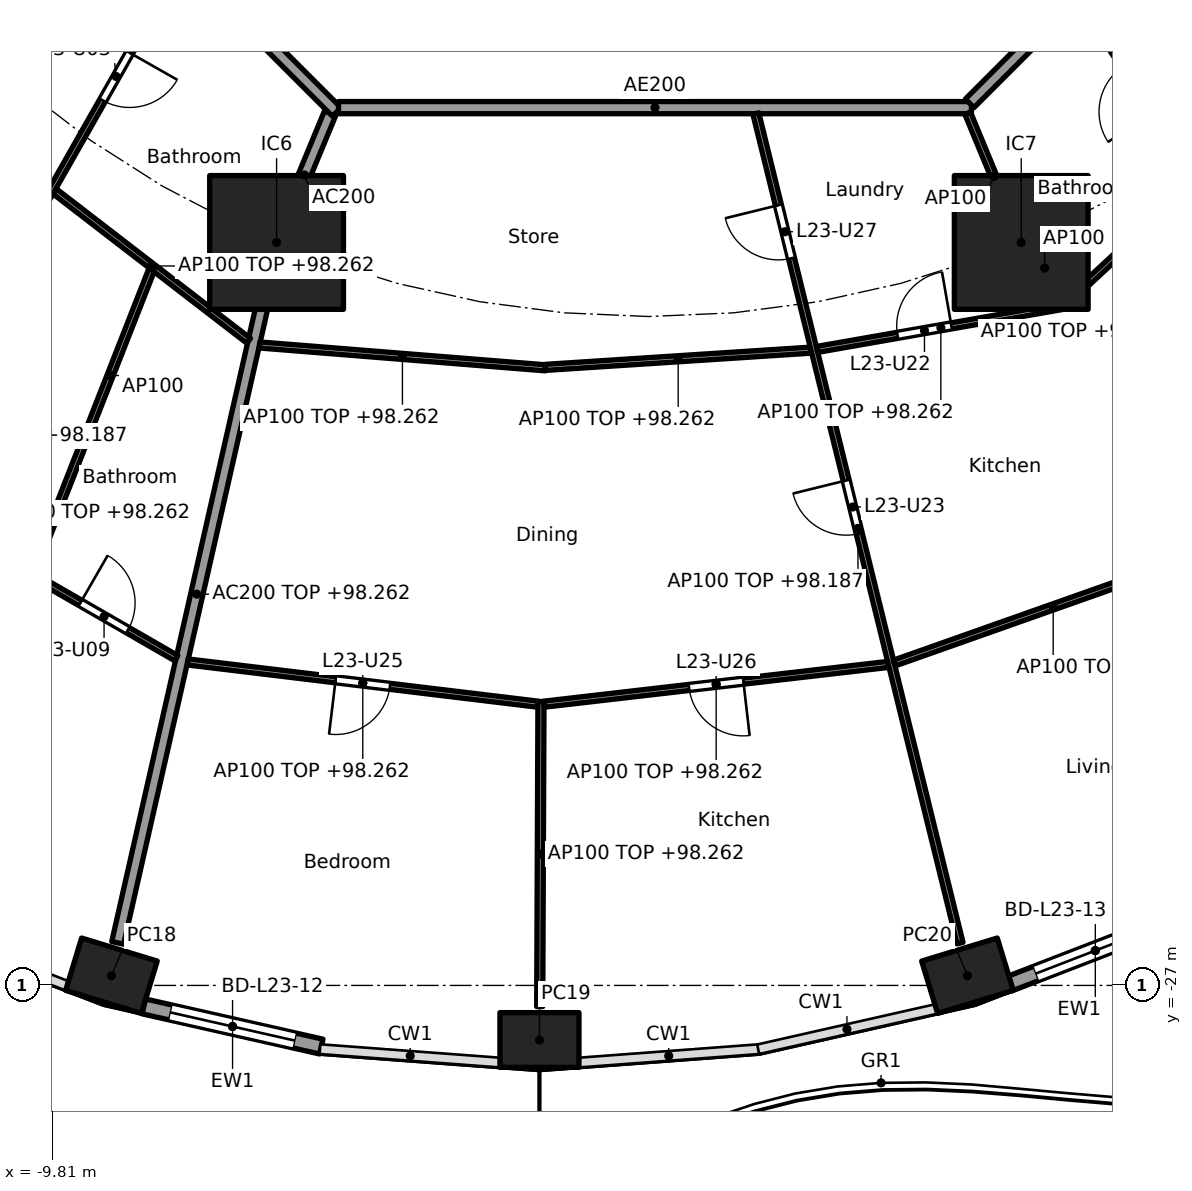
"""IFC4 building model, lengths in metres.
Left out: names, types, materials, properties, quantities, classifications, styles, units other than length and angle.
Written with IfcOpenShell. Run it as: python <this file> out.ifc"""

import sys

from ifc_helpers import new_model, si_unit, direction, frame, frame_2d, origin, origin_2d, place, context, subcontext, project, spatial, rectangle, hollow_rectangle, extrude, element, fill, save


model = new_model("IFC4")
c1 = context("Model", 3, precision=1e-05, world=origin(), true_north=direction((0.0, 1.0)))
c2 = subcontext(c1, "Body", "Model", "MODEL_VIEW")
j1 = project(units=[si_unit("LENGTHUNIT", "METRE"), si_unit("PLANEANGLEUNIT", "RADIAN")], contexts=[c1])
p1 = place(None, origin())
s1 = spatial("IfcSite", under=j1, at=p1, CompositionType="ELEMENT")
p2 = place(p1, origin())
s2 = spatial("IfcBuilding", under=s1, at=p2, CompositionType="ELEMENT")
p3 = place(p2, frame((0.0, 0.0, 95.5)))
s3 = spatial("IfcBuildingStorey", under=s2, at=p3, CompositionType="ELEMENT", Elevation=95.5)
for number, where, z_axis, x_axis in (
    (1, (-8.839, -26.841, 0.0), (0.0, 0.0, 1.0), (0.957, -0.292, 0.0)),
    (2, (-1.8, -27.897, 0.0), (0.0, 0.0, 1.0), (1.0, 0.0, 0.0)),
    (3, (5.239, -26.841, 0.0), (0.0, 0.0, 1.0), (0.957, 0.292, 0.0)),
):
    element("IfcColumn", number, at=place(p3, frame(where, z_axis=z_axis, x_axis=x_axis)), inside=s3, PredefinedType="COLUMN", context=c2, shape_type="SweptSolid", body=[
        extrude(hollow_rectangle(XDim=1.3, YDim=0.9, WallThickness=0.045, at=origin_2d()), origin(), (0.0, 0.0, 1.0), 3.7),
    ])
for number, where, z_axis, x_axis in (
    (4, (-6.123, -14.782, 0.0), (0.0, 0.0, 1.0), (1.0, 0.0, 0.0)),
    (5, (6.123, -14.782, 0.0), (0.0, 0.0, 1.0), (1.0, 0.0, 0.0)),
):
    element("IfcColumn", number, at=place(p3, frame(where, z_axis=z_axis, x_axis=x_axis)), inside=s3, PredefinedType="COLUMN", context=c2, shape_type="SweptSolid", body=[
        extrude(rectangle(XDim=2.2, YDim=2.2, at=origin_2d()), origin(), (0.0, 0.0, 1.0), 3.7),
    ])
p4 = place(p3, frame((-5.387, -28.006, 0.0), z_axis=(0.0, 0.0, 1.0), x_axis=(-0.975317607872, 0.220806620767, 0.0)))
e6 = element("IfcWall", 6, at=p4, inside=s3, PredefinedType="SOLIDWALL", context=c2, shape_type="SweptSolid", body=[
    extrude(rectangle(XDim=2.993, YDim=0.25, at=frame_2d((1.497, 0.0))), origin(), (0.0, 0.0, 1.0), 3.44),
])
p5 = place(p4, frame((0.447, 0.0, 0.0)))
e7 = element("IfcOpeningElement", 7, at=p5, cuts=e6, PredefinedType="OPENING", context=c2, shape_type="SweptSolid", body=[
    extrude(rectangle(XDim=2.1, YDim=2.4, at=frame_2d((1.05, 1.2))), frame((0.0, 0.135, 0.0), z_axis=(0.0, -1.0, 0.0), x_axis=(1.0, 0.0, 0.0)), (0.0, 0.0, 1.0), 0.27),
])
p6 = place(p3, frame((8.753, -25.882, 0.0), z_axis=(0.0, 0.0, 1.0), x_axis=(-0.932837560624, -0.360297218263, 0.0)))
e8 = element("IfcWall", 8, at=p6, inside=s3, PredefinedType="SOLIDWALL", context=c2, shape_type="SweptSolid", body=[
    extrude(rectangle(XDim=3.028, YDim=0.25, at=frame_2d((1.514, 0.0))), origin(), (0.0, 0.0, 1.0), 3.44),
])
p7 = place(p6, frame((0.464, 0.0, 0.0)))
e9 = element("IfcOpeningElement", 9, at=p7, cuts=e8, PredefinedType="OPENING", context=c2, shape_type="SweptSolid", body=[
    extrude(rectangle(XDim=2.1, YDim=2.4, at=frame_2d((1.05, 1.2))), frame((0.0, 0.135, 0.0), z_axis=(0.0, -1.0, 0.0), x_axis=(1.0, 0.0, 0.0)), (0.0, 0.0, 1.0), 0.27),
])
p8 = place(p3, frame((-5.243, -12.657, 0.0), z_axis=(0.0, 0.0, 1.0), x_axis=(-0.382668627144, -0.923885664896, 0.0)))
e10 = element("IfcWall", 10, at=p8, inside=s3, PredefinedType="PARTITIONING", context=c2, shape_type="SweptSolid", body=[
    extrude(rectangle(XDim=2.2, YDim=0.2, at=frame_2d((1.1, 0.0))), origin(), (0.0, 0.0, 1.0), 3.44),
])
p9 = place(p3, frame((-6.134, -14.831, 0.0), z_axis=(0.0, 0.0, 1.0), x_axis=(-0.221225405869, -0.975222702667, 0.0)))
e11 = element("IfcWall", 11, at=p9, inside=s3, PredefinedType="PARTITIONING", context=c2, shape_type="SweptSolid", body=[
    extrude(rectangle(XDim=11.761, YDim=0.2, at=frame_2d((5.88, 0.0))), origin(), (0.0, 0.0, 1.0), 2.762),
])
p10 = place(p3, frame((-12.635, -5.134, 0.0), z_axis=(0.0, 0.0, 1.0), x_axis=(0.707106781187, -0.707106781187, 0.0)))
e12 = element("IfcWall", 12, at=p10, inside=s3, PredefinedType="PARTITIONING", context=c2, shape_type="SweptSolid", body=[
    extrude(rectangle(XDim=10.609, YDim=0.2, at=frame_2d((5.305, 0.0))), origin(), (0.0, 0.0, 1.0), 3.44),
])
p11 = place(p10, frame((4.804, 0.0, 0.0)))
e13 = element("IfcOpeningElement", 13, at=p11, cuts=e12, PredefinedType="OPENING", context=c2, shape_type="SweptSolid", body=[
    extrude(rectangle(XDim=1.0, YDim=2.1, at=frame_2d((0.5, 1.05))), frame((0.0, 0.11, 0.0), z_axis=(0.0, -1.0, 0.0), x_axis=(1.0, 0.0, 0.0)), (0.0, 0.0, 1.0), 0.22),
])
p12 = place(p3, frame((-5.104, -12.565, 0.0), z_axis=(0.0, 0.0, 1.0), x_axis=(1.0, 0.0, 0.0)))
e14 = element("IfcWall", 14, at=p12, inside=s3, PredefinedType="PARTITIONING", context=c2, shape_type="SweptSolid", body=[
    extrude(rectangle(XDim=10.409, YDim=0.2, at=frame_2d((5.205, 0.0))), origin(), (0.0, 0.0, 1.0), 3.44),
])
p13 = place(p3, frame((5.275, -12.494, 0.0), z_axis=(0.0, 0.0, 1.0), x_axis=(0.707106781187, 0.707106781187, 0.0)))
e15 = element("IfcWall", 15, at=p13, inside=s3, PredefinedType="PARTITIONING", context=c2, shape_type="SweptSolid", body=[
    extrude(rectangle(XDim=10.409, YDim=0.2, at=frame_2d((5.205, 0.0))), origin(), (0.0, 0.0, 1.0), 3.44),
])
p14 = place(p13, frame((3.303, 0.0, 0.0)))
e16 = element("IfcOpeningElement", 16, at=p14, cuts=e15, PredefinedType="OPENING", context=c2, shape_type="SweptSolid", body=[
    extrude(rectangle(XDim=1.0, YDim=2.1, at=frame_2d((0.5, 1.05))), frame((0.0, 0.11, 0.0), z_axis=(0.0, -1.0, 0.0), x_axis=(1.0, 0.0, 0.0)), (0.0, 0.0, 1.0), 0.22),
])
p15 = place(p3, frame((-7.707, -10.198, 0.0), z_axis=(0.0, 0.0, 1.0), x_axis=(-0.49395524734, -0.869487328042, 0.0)))
e17 = element("IfcWall", 17, at=p15, inside=s3, PredefinedType="PARTITIONING", context=c2, shape_type="SweptSolid", body=[
    extrude(rectangle(XDim=15.025, YDim=0.1, at=frame_2d((7.512, 0.0))), origin(), (0.0, 0.0, 1.0), 2.687),
])
p16 = place(p15, frame((1.684, 0.0, 0.0)))
e18 = element("IfcOpeningElement", 18, at=p16, cuts=e17, PredefinedType="OPENING", context=c2, shape_type="SweptSolid", body=[
    extrude(rectangle(XDim=0.9, YDim=2.1, at=frame_2d((0.45, 1.05))), frame((0.0, 0.06, 0.0), z_axis=(0.0, -1.0, 0.0), x_axis=(1.0, 0.0, 0.0)), (0.0, 0.0, 1.0), 0.12),
])
p17 = place(p15, frame((6.648, 0.0, 0.0)))
e19 = element("IfcOpeningElement", 19, at=p17, cuts=e17, PredefinedType="OPENING", context=c2, shape_type="SweptSolid", body=[
    extrude(rectangle(XDim=0.9, YDim=2.1, at=frame_2d((0.45, 1.05))), frame((0.0, 0.06, 0.0), z_axis=(0.0, -1.0, 0.0), x_axis=(1.0, 0.0, 0.0)), (0.0, 0.0, 1.0), 0.12),
])
p18 = place(p15, frame((12.027, 0.0, 0.0)))
e20 = element("IfcOpeningElement", 20, at=p18, cuts=e17, PredefinedType="OPENING", context=c2, shape_type="SweptSolid", body=[
    extrude(rectangle(XDim=0.9, YDim=2.1, at=frame_2d((0.45, 1.05))), frame((0.0, 0.06, 0.0), z_axis=(0.0, -1.0, 0.0), x_axis=(1.0, 0.0, 0.0)), (0.0, 0.0, 1.0), 0.12),
])
p19 = place(p3, frame((-9.775, -13.939, 0.0), z_axis=(0.0, 0.0, 1.0), x_axis=(0.792162117554, -0.610310723741, 0.0)))
e21 = element("IfcWall", 21, at=p19, inside=s3, PredefinedType="PARTITIONING", context=c2, shape_type="SweptSolid", body=[
    extrude(rectangle(XDim=4.03, YDim=0.1, at=frame_2d((2.015, 0.0))), origin(), (0.0, 0.0, 1.0), 2.762),
])
p20 = place(p3, frame((-12.568, -18.856, 0.0), z_axis=(0.0, 0.0, 1.0), x_axis=(0.866533437451, -0.499119025664, 0.0)))
e22 = element("IfcWall", 22, at=p20, inside=s3, PredefinedType="PARTITIONING", context=c2, shape_type="SweptSolid", body=[
    extrude(rectangle(XDim=5.535, YDim=0.1, at=frame_2d((2.768, 0.0))), origin(), (0.0, 0.0, 1.0), 2.762),
])
p21 = place(p20, frame((3.714, 0.0, 0.0)))
e23 = element("IfcOpeningElement", 23, at=p21, cuts=e22, PredefinedType="OPENING", context=c2, shape_type="SweptSolid", body=[
    extrude(rectangle(XDim=0.9, YDim=2.1, at=frame_2d((0.45, 1.05))), frame((0.0, 0.06, 0.0), z_axis=(0.0, -1.0, 0.0), x_axis=(1.0, 0.0, 0.0)), (0.0, 0.0, 1.0), 0.12),
])
p22 = place(p3, frame((-8.177, -15.231, 0.0), z_axis=(0.0, 0.0, 1.0), x_axis=(-0.365520869553, -0.930803144559, 0.0)))
e24 = element("IfcWall", 24, at=p22, inside=s3, PredefinedType="PARTITIONING", context=c2, shape_type="SweptSolid", body=[
    extrude(rectangle(XDim=5.342, YDim=0.1, at=frame_2d((2.671, 0.0))), origin(), (0.0, 0.0, 1.0), 3.44),
])
p23 = place(p3, frame((-6.404, -16.468, 0.0), z_axis=(0.0, 0.0, 1.0), x_axis=(0.996817253426, -0.079720532316, 0.0)))
e25 = element("IfcWall", 25, at=p23, inside=s3, PredefinedType="PARTITIONING", context=c2, shape_type="SweptSolid", body=[
    extrude(rectangle(XDim=4.716, YDim=0.1, at=frame_2d((2.358, 0.0))), origin(), (0.0, 0.0, 1.0), 2.762),
])
p24 = place(p3, frame((-7.586, -21.68, 0.0), z_axis=(0.0, 0.0, 1.0), x_axis=(0.992810189026, -0.119699325668, 0.0)))
e26 = element("IfcWall", 26, at=p24, inside=s3, PredefinedType="PARTITIONING", context=c2, shape_type="SweptSolid", body=[
    extrude(rectangle(XDim=5.803, YDim=0.1, at=frame_2d((2.901, 0.0))), origin(), (0.0, 0.0, 1.0), 2.762),
])
p25 = place(p24, frame((2.451, 0.0, 0.0)))
e27 = element("IfcOpeningElement", 27, at=p25, cuts=e26, PredefinedType="OPENING", context=c2, shape_type="SweptSolid", body=[
    extrude(rectangle(XDim=0.9, YDim=2.1, at=frame_2d((0.45, 1.05))), frame((0.0, 0.06, 0.0), z_axis=(0.0, -1.0, 0.0), x_axis=(1.0, 0.0, 0.0)), (0.0, 0.0, 1.0), 0.12),
])
p26 = place(p3, frame((-1.703, -16.836, 0.0), z_axis=(0.0, 0.0, 1.0), x_axis=(0.997897941075, 0.064805086209, 0.0)))
e28 = element("IfcWall", 28, at=p26, inside=s3, PredefinedType="PARTITIONING", context=c2, shape_type="SweptSolid", body=[
    extrude(rectangle(XDim=4.378, YDim=0.1, at=frame_2d((2.189, 0.0))), origin(), (0.0, 0.0, 1.0), 2.762),
])
p27 = place(p3, frame((-1.775, -22.331, 0.0), z_axis=(0.0, 0.0, 1.0), x_axis=(-0.004088153894, -0.999991643464, 0.0)))
e29 = element("IfcWall", 29, at=p27, inside=s3, PredefinedType="PARTITIONING", context=c2, shape_type="SweptSolid", body=[
    extrude(rectangle(XDim=5.016, YDim=0.1, at=frame_2d((2.508, 0.0))), origin(), (0.0, 0.0, 1.0), 2.762),
])
p28 = place(p3, frame((-1.726, -22.375, 0.0), z_axis=(0.0, 0.0, 1.0), x_axis=(0.99339223329, 0.114768771187, 0.0)))
e30 = element("IfcWall", 30, at=p28, inside=s3, PredefinedType="PARTITIONING", context=c2, shape_type="SweptSolid", body=[
    extrude(rectangle(XDim=5.701, YDim=0.1, at=frame_2d((2.851, 0.0))), origin(), (0.0, 0.0, 1.0), 2.762),
])
p29 = place(p28, frame((2.4, 0.0, 0.0)))
e31 = element("IfcOpeningElement", 31, at=p29, cuts=e30, PredefinedType="OPENING", context=c2, shape_type="SweptSolid", body=[
    extrude(rectangle(XDim=0.9, YDim=2.1, at=frame_2d((0.45, 1.05))), frame((0.0, 0.06, 0.0), z_axis=(0.0, -1.0, 0.0), x_axis=(1.0, 0.0, 0.0)), (0.0, 0.0, 1.0), 0.12),
])
p30 = place(p3, frame((1.759, -12.662, 0.0), z_axis=(0.0, 0.0, 1.0), x_axis=(0.239021819854, -0.971014196412, 0.0)))
e32 = element("IfcWall", 32, at=p30, inside=s3, PredefinedType="PARTITIONING", context=c2, shape_type="SweptSolid", body=[
    extrude(rectangle(XDim=14.05, YDim=0.1, at=frame_2d((7.025, 0.0))), origin(), (0.0, 0.0, 1.0), 2.687),
])
p31 = place(p30, frame((6.214, 0.0, 0.0)))
e33 = element("IfcOpeningElement", 33, at=p31, cuts=e32, PredefinedType="OPENING", context=c2, shape_type="SweptSolid", body=[
    extrude(rectangle(XDim=0.9, YDim=2.1, at=frame_2d((0.45, 1.05))), frame((0.0, 0.06, 0.0), z_axis=(0.0, -1.0, 0.0), x_axis=(1.0, 0.0, 0.0)), (0.0, 0.0, 1.0), 0.12),
])
p32 = place(p30, frame((1.552, 0.0, 0.0)))
e34 = element("IfcOpeningElement", 34, at=p32, cuts=e32, PredefinedType="OPENING", context=c2, shape_type="SweptSolid", body=[
    extrude(rectangle(XDim=0.9, YDim=2.1, at=frame_2d((0.45, 1.05))), frame((0.0, 0.06, 0.0), z_axis=(0.0, -1.0, 0.0), x_axis=(1.0, 0.0, 0.0)), (0.0, 0.0, 1.0), 0.12),
])
p33 = place(p3, frame((2.765, -16.541, 0.0), z_axis=(0.0, 0.0, 1.0), x_axis=(0.984998612286, 0.172562260633, 0.0)))
e35 = element("IfcWall", 35, at=p33, inside=s3, PredefinedType="PARTITIONING", context=c2, shape_type="SweptSolid", body=[
    extrude(rectangle(XDim=4.134, YDim=0.1, at=frame_2d((2.067, 0.0))), origin(), (0.0, 0.0, 1.0), 2.762),
])
p34 = place(p33, frame((1.344, 0.0, 0.0)))
e36 = element("IfcOpeningElement", 36, at=p34, cuts=e35, PredefinedType="OPENING", context=c2, shape_type="SweptSolid", body=[
    extrude(rectangle(XDim=0.9, YDim=2.1, at=frame_2d((0.45, 1.05))), frame((0.0, 0.06, 0.0), z_axis=(0.0, -1.0, 0.0), x_axis=(1.0, 0.0, 0.0)), (0.0, 0.0, 1.0), 0.12),
])
p35 = place(p3, frame((4.034, -21.698, 0.0), z_axis=(0.0, 0.0, 1.0), x_axis=(0.942864271692, 0.333177077794, 0.0)))
e37 = element("IfcWall", 37, at=p35, inside=s3, PredefinedType="PARTITIONING", context=c2, shape_type="SweptSolid", body=[
    extrude(rectangle(XDim=5.545, YDim=0.1, at=frame_2d((2.772, 0.0))), origin(), (0.0, 0.0, 1.0), 2.762),
])
p36 = place(p3, frame((5.243, -12.657, 0.0), z_axis=(0.0, 0.0, 1.0), x_axis=(0.382719158442, -0.923864733477, 0.0)))
e38 = element("IfcWall", 38, at=p36, inside=s3, PredefinedType="PARTITIONING", context=c2, shape_type="SweptSolid", body=[
    extrude(rectangle(XDim=2.25, YDim=0.1, at=frame_2d((1.125, 0.0))), origin(), (0.0, 0.0, 1.0), 3.44),
])
p37 = place(p3, frame((6.824, -15.802, 0.0), z_axis=(0.0, 0.0, 1.0), x_axis=(0.733007232109, 0.680220844782, 0.0)))
e39 = element("IfcWall", 39, at=p37, inside=s3, PredefinedType="PARTITIONING", context=c2, shape_type="SweptSolid", body=[
    extrude(rectangle(XDim=2.969, YDim=0.1, at=frame_2d((1.485, 0.0))), origin(), (0.0, 0.0, 1.0), 2.762),
])
p38 = place(p3, frame((7.1, -10.808, 0.0), z_axis=(0.0, 0.0, 1.0), x_axis=(0.550294419528, -0.834970689208, 0.0)))
e40 = element("IfcWall", 40, at=p38, inside=s3, PredefinedType="PARTITIONING", context=c2, shape_type="SweptSolid", body=[
    extrude(rectangle(XDim=3.472, YDim=0.1, at=frame_2d((1.736, 0.0))), origin(), (0.0, 0.0, 1.0), 2.687),
])
p39 = place(p38, frame((1.286, 0.0, 0.0)))
e41 = element("IfcOpeningElement", 41, at=p39, cuts=e40, PredefinedType="OPENING", context=c2, shape_type="SweptSolid", body=[
    extrude(rectangle(XDim=0.9, YDim=2.1, at=frame_2d((0.45, 1.05))), frame((0.0, 0.06, 0.0), z_axis=(0.0, -1.0, 0.0), x_axis=(1.0, 0.0, 0.0)), (0.0, 0.0, 1.0), 0.12),
])
p40 = place(p3, frame((6.781, -15.638, 0.0), z_axis=(0.0, 0.0, 1.0), x_axis=(-0.533419461524, 0.845850860417, 0.0)))
e42 = element("IfcWall", 42, at=p40, inside=s3, PredefinedType="PARTITIONING", context=c2, shape_type="SweptSolid", body=[
    extrude(rectangle(XDim=1.025, YDim=0.1, at=frame_2d((0.513, 0.0))), origin(), (0.0, 0.0, 1.0), 3.44),
])
p41 = place(p5, origin())
e43 = element("IfcDoor", 43, at=p41, inside=s3, OperationType="SLIDING_TO_LEFT", PredefinedType="DOOR", context=c2, shape_type="SweptSolid", body=[
    extrude(rectangle(XDim=2.1, YDim=2.4, at=frame_2d((1.05, 1.2))), frame((0.0, 0.025, 0.0), z_axis=(0.0, -1.0, 0.0), x_axis=(1.0, 0.0, 0.0)), (0.0, 0.0, 1.0), 0.05),
])
fill(e7, e43)
p42 = place(p7, origin())
e44 = element("IfcDoor", 44, at=p42, inside=s3, OperationType="SLIDING_TO_LEFT", PredefinedType="DOOR", context=c2, shape_type="SweptSolid", body=[
    extrude(rectangle(XDim=2.1, YDim=2.4, at=frame_2d((1.05, 1.2))), frame((0.0, 0.025, 0.0), z_axis=(0.0, -1.0, 0.0), x_axis=(1.0, 0.0, 0.0)), (0.0, 0.0, 1.0), 0.05),
])
fill(e9, e44)
p43 = place(p16, origin())
e45 = element("IfcDoor", 45, at=p43, inside=s3, OperationType="SINGLE_SWING_LEFT", PredefinedType="DOOR", context=c2, shape_type="SweptSolid", body=[
    extrude(rectangle(XDim=0.9, YDim=2.1, at=frame_2d((0.45, 1.05))), frame((0.0, 0.025, 0.0), z_axis=(0.0, -1.0, 0.0), x_axis=(1.0, 0.0, 0.0)), (0.0, 0.0, 1.0), 0.05),
])
fill(e18, e45)
p44 = place(p21, origin())
e46 = element("IfcDoor", 46, at=p44, inside=s3, OperationType="SINGLE_SWING_LEFT", PredefinedType="DOOR", context=c2, shape_type="SweptSolid", body=[
    extrude(rectangle(XDim=0.9, YDim=2.1, at=frame_2d((0.45, 1.05))), frame((0.0, 0.025, 0.0), z_axis=(0.0, -1.0, 0.0), x_axis=(1.0, 0.0, 0.0)), (0.0, 0.0, 1.0), 0.05),
])
fill(e23, e46)
p45 = place(p34, origin())
e47 = element("IfcDoor", 47, at=p45, inside=s3, OperationType="SINGLE_SWING_RIGHT", PredefinedType="DOOR", context=c2, shape_type="SweptSolid", body=[
    extrude(rectangle(XDim=0.9, YDim=2.1, at=frame_2d((0.45, 1.05))), frame((0.0, 0.025, 0.0), z_axis=(0.0, -1.0, 0.0), x_axis=(1.0, 0.0, 0.0)), (0.0, 0.0, 1.0), 0.05),
])
fill(e36, e47)
p46 = place(p31, frame((0.9, 0.0, 0.0), x_axis=(-1.0, 0.0, 0.0)))
e48 = element("IfcDoor", 48, at=p46, inside=s3, OperationType="SINGLE_SWING_RIGHT", PredefinedType="DOOR", context=c2, shape_type="SweptSolid", body=[
    extrude(rectangle(XDim=0.9, YDim=2.1, at=frame_2d((0.45, 1.05))), frame((0.0, 0.025, 0.0), z_axis=(0.0, -1.0, 0.0), x_axis=(1.0, 0.0, 0.0)), (0.0, 0.0, 1.0), 0.05),
])
fill(e33, e48)
p47 = place(p25, frame((0.9, 0.0, 0.0), x_axis=(-1.0, 0.0, 0.0)))
e49 = element("IfcDoor", 49, at=p47, inside=s3, OperationType="SINGLE_SWING_RIGHT", PredefinedType="DOOR", context=c2, shape_type="SweptSolid", body=[
    extrude(rectangle(XDim=0.9, YDim=2.1, at=frame_2d((0.45, 1.05))), frame((0.0, 0.025, 0.0), z_axis=(0.0, -1.0, 0.0), x_axis=(1.0, 0.0, 0.0)), (0.0, 0.0, 1.0), 0.05),
])
fill(e27, e49)
p48 = place(p29, frame((0.9, 0.0, 0.0), x_axis=(-1.0, 0.0, 0.0)))
e50 = element("IfcDoor", 50, at=p48, inside=s3, OperationType="SINGLE_SWING_LEFT", PredefinedType="DOOR", context=c2, shape_type="SweptSolid", body=[
    extrude(rectangle(XDim=0.9, YDim=2.1, at=frame_2d((0.45, 1.05))), frame((0.0, 0.025, 0.0), z_axis=(0.0, -1.0, 0.0), x_axis=(1.0, 0.0, 0.0)), (0.0, 0.0, 1.0), 0.05),
])
fill(e31, e50)
p49 = place(p32, frame((0.9, 0.0, 0.0), x_axis=(-1.0, 0.0, 0.0)))
e51 = element("IfcDoor", 51, at=p49, inside=s3, OperationType="SINGLE_SWING_RIGHT", PredefinedType="DOOR", context=c2, shape_type="SweptSolid", body=[
    extrude(rectangle(XDim=0.9, YDim=2.1, at=frame_2d((0.45, 1.05))), frame((0.0, 0.025, 0.0), z_axis=(0.0, -1.0, 0.0), x_axis=(1.0, 0.0, 0.0)), (0.0, 0.0, 1.0), 0.05),
])
fill(e34, e51)
save(model, sys.argv[1])
